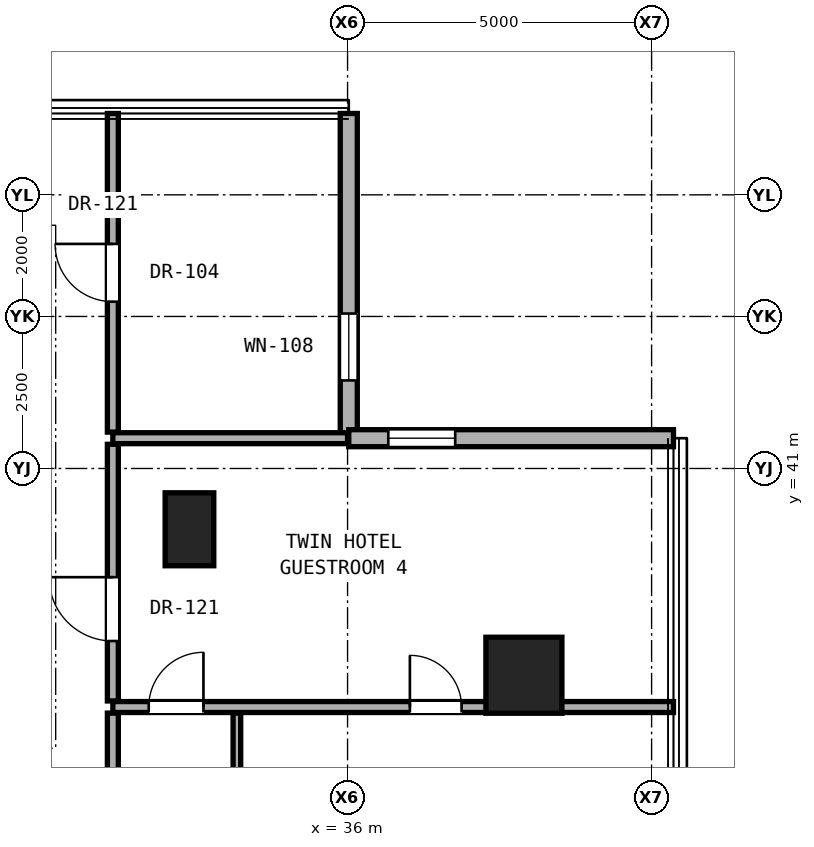
"""IFC4 building model, lengths in metres.
Left out: names, types, materials, properties, quantities, classifications, styles, units other than length and angle.
Written with IfcOpenShell. Run it as: python <this file> out.ifc"""

import sys

from ifc_helpers import new_model, si_unit, direction, frame, frame_2d, origin, origin_2d, place, context, subcontext, project, spatial, rectangle, hollow_rectangle, extrude, element, fill, save


model = new_model("IFC4")
c1 = context("Model", 3, precision=1e-05, world=origin(), true_north=direction((0.0, 1.0)))
c2 = subcontext(c1, "Body", "Model", "MODEL_VIEW")
j1 = project(units=[si_unit("LENGTHUNIT", "METRE"), si_unit("PLANEANGLEUNIT", "RADIAN")], contexts=[c1])
p1 = place(None, origin())
s1 = spatial("IfcSite", under=j1, at=p1, CompositionType="ELEMENT")
p2 = place(p1, origin())
s2 = spatial("IfcBuilding", under=s1, at=p2, CompositionType="ELEMENT")
p3 = place(p2, frame((0.0, 0.0, 55.4)))
s3 = spatial("IfcBuildingStorey", under=s2, at=p3, CompositionType="ELEMENT", Elevation=55.4)
p4 = place(p3, frame((38.9, 37.6, 0.0), z_axis=(0.0, 0.0, 1.0), x_axis=(1.0, 0.0, 0.0)))
e1 = element("IfcColumn", 1, at=p4, inside=s3, PredefinedType="COLUMN", context=c2, shape_type="SweptSolid", body=[
    extrude(hollow_rectangle(XDim=1.25, YDim=1.25, WallThickness=0.07, at=origin_2d()), origin(), (0.0, 0.0, 1.0), 3.3),
])
p5 = place(p3, frame((33.4, 40.0, 0.0), z_axis=(0.0, 0.0, 1.0), x_axis=(1.0, 0.0, 0.0)))
e2 = element("IfcColumn", 2, at=p5, inside=s3, PredefinedType="PILASTER", context=c2, shape_type="SweptSolid", body=[
    extrude(rectangle(XDim=0.8, YDim=1.2, at=origin_2d()), origin(), (0.0, 0.0, 1.0), 3.3),
])
p6 = place(p3, frame((36.02, 41.498, 0.0), z_axis=(0.0, 0.0, 1.0), x_axis=(0.0, 1.0, 0.0)))
e3 = element("IfcWall", 3, at=p6, inside=s3, PredefinedType="SOLIDWALL", context=c2, shape_type="SweptSolid", body=[
    extrude(rectangle(XDim=5.34, YDim=0.28, at=frame_2d((2.67, 0.0))), origin(), (0.0, 0.0, 1.0), 3.04),
])
p7 = place(p6, frame((0.95, 0.0, 0.85)))
e4 = element("IfcOpeningElement", 4, at=p7, cuts=e3, PredefinedType="OPENING", context=c2, shape_type="SweptSolid", body=[
    extrude(rectangle(XDim=1.1, YDim=2.0, at=frame_2d((0.55, 1.0))), frame((0.0, 0.15, 0.0), z_axis=(0.0, -1.0, 0.0), x_axis=(1.0, 0.0, 0.0)), (0.0, 0.0, 1.0), 0.3),
])
p8 = place(p3, frame((41.36, 41.498, 0.0), z_axis=(0.0, 0.0, 1.0), x_axis=(-1.0, 0.0, 0.0)))
e5 = element("IfcWall", 5, at=p8, inside=s3, PredefinedType="SOLIDWALL", context=c2, shape_type="SweptSolid", body=[
    extrude(rectangle(XDim=5.34, YDim=0.28, at=frame_2d((2.67, 0.0))), origin(), (0.0, 0.0, 1.0), 3.04),
])
p9 = place(p8, frame((3.59, 0.0, 0.85)))
e6 = element("IfcOpeningElement", 6, at=p9, cuts=e5, PredefinedType="OPENING", context=c2, shape_type="SweptSolid", body=[
    extrude(rectangle(XDim=1.1, YDim=2.0, at=frame_2d((0.55, 1.0))), frame((0.0, 0.15, 0.0), z_axis=(0.0, -1.0, 0.0), x_axis=(1.0, 0.0, 0.0)), (0.0, 0.0, 1.0), 0.3),
])
p10 = place(p3, frame((32.14, 37.077, 0.0), z_axis=(0.0, 0.0, 1.0), x_axis=(1.0, 0.0, 0.0)))
e7 = element("IfcWall", 7, at=p10, inside=s3, PredefinedType="PARTITIONING", context=c2, shape_type="SweptSolid", body=[
    extrude(rectangle(XDim=9.22, YDim=0.18, at=frame_2d((4.61, 0.0))), origin(), (0.0, 0.0, 1.0), 2.125),
])
p11 = place(p10, frame((4.885, 0.0, 0.0)))
e8 = element("IfcOpeningElement", 8, at=p11, cuts=e7, PredefinedType="OPENING", context=c2, shape_type="SweptSolid", body=[
    extrude(rectangle(XDim=0.85, YDim=2.01, at=frame_2d((0.425, 1.005))), frame((0.0, 0.1, 0.0), z_axis=(0.0, -1.0, 0.0), x_axis=(1.0, 0.0, 0.0)), (0.0, 0.0, 1.0), 0.2),
])
p12 = place(p10, frame((0.59, 0.0, 0.0)))
e9 = element("IfcOpeningElement", 9, at=p12, cuts=e7, PredefinedType="OPENING", context=c2, shape_type="SweptSolid", body=[
    extrude(rectangle(XDim=0.9, YDim=2.1, at=frame_2d((0.45, 1.05))), frame((0.0, 0.1, 0.0), z_axis=(0.0, -1.0, 0.0), x_axis=(1.0, 0.0, 0.0)), (0.0, 0.0, 1.0), 0.2),
])
p13 = place(p3, frame((32.14, 41.498, 0.0), z_axis=(0.0, 0.0, 1.0), x_axis=(1.0, 0.0, 0.0)))
e10 = element("IfcWall", 10, at=p13, inside=s3, PredefinedType="PARTITIONING", context=c2, shape_type="SweptSolid", body=[
    extrude(rectangle(XDim=3.86, YDim=0.18, at=frame_2d((1.93, 0.0))), origin(), (0.0, 0.0, 1.0), 3.06),
])
p14 = place(p3, frame((32.14, 34.429, 0.0), z_axis=(0.0, 0.0, 1.0), x_axis=(0.0, 1.0, 0.0)))
e11 = element("IfcWall", 11, at=p14, inside=s3, PredefinedType="PARTITIONING", context=c2, shape_type="SweptSolid", body=[
    extrude(rectangle(XDim=2.548, YDim=0.18, at=frame_2d((1.274, 0.0))), origin(), (0.0, 0.0, 1.0), 3.06),
])
p15 = place(p3, frame((32.14, 37.177, 0.0), z_axis=(0.0, 0.0, 1.0), x_axis=(0.0, 1.0, 0.0)))
e12 = element("IfcWall", 12, at=p15, inside=s3, PredefinedType="PARTITIONING", context=c2, shape_type="SweptSolid", body=[
    extrude(rectangle(XDim=4.221, YDim=0.18, at=frame_2d((2.11, 0.0))), origin(), (0.0, 0.0, 1.0), 2.436),
])
p16 = place(p15, frame((0.986, 0.0, 0.0)))
e13 = element("IfcOpeningElement", 13, at=p16, cuts=e12, PredefinedType="OPENING", context=c2, shape_type="SweptSolid", body=[
    extrude(rectangle(XDim=1.05, YDim=2.2, at=frame_2d((0.525, 1.1))), frame((0.0, 0.1, 0.0), z_axis=(0.0, -1.0, 0.0), x_axis=(1.0, 0.0, 0.0)), (0.0, 0.0, 1.0), 0.2),
])
p17 = place(p3, frame((32.14, 41.598, 0.0), z_axis=(0.0, 0.0, 1.0), x_axis=(0.0, 1.0, 0.0)))
e14 = element("IfcWall", 14, at=p17, inside=s3, PredefinedType="PARTITIONING", context=c2, shape_type="SweptSolid", body=[
    extrude(rectangle(XDim=5.24, YDim=0.18, at=frame_2d((2.62, 0.0))), origin(), (0.0, 0.0, 1.0), 3.06),
])
p18 = place(p17, frame((2.145, 0.0, 0.0)))
e15 = element("IfcOpeningElement", 15, at=p18, cuts=e14, PredefinedType="OPENING", context=c2, shape_type="SweptSolid", body=[
    extrude(rectangle(XDim=0.95, YDim=2.15, at=frame_2d((0.475, 1.075))), frame((0.0, 0.1, 0.0), z_axis=(0.0, -1.0, 0.0), x_axis=(1.0, 0.0, 0.0)), (0.0, 0.0, 1.0), 0.2),
])
p19 = place(p3, frame((34.18, 34.429, 0.0), z_axis=(0.0, 0.0, 1.0), x_axis=(0.0, 1.0, 0.0)))
e16 = element("IfcWall", 16, at=p19, inside=s3, PredefinedType="PARTITIONING", context=c2, shape_type="SweptSolid", body=[
    extrude(rectangle(XDim=2.548, YDim=0.125, at=frame_2d((1.274, 0.0))), origin(), (0.0, 0.0, 1.0), 3.06),
])
p20 = place(p7, origin())
e17 = element("IfcWindow", 17, at=p20, inside=s3, PartitioningType="SINGLE_PANEL", PredefinedType="WINDOW", context=c2, shape_type="SweptSolid", body=[
    extrude(rectangle(XDim=1.1, YDim=2.0, at=frame_2d((0.55, 1.0))), frame((0.0, 0.03, 0.0), z_axis=(0.0, -1.0, 0.0), x_axis=(1.0, 0.0, 0.0)), (0.0, 0.0, 1.0), 0.06),
])
fill(e4, e17)
p21 = place(p9, origin())
e18 = element("IfcWindow", 18, at=p21, inside=s3, PartitioningType="SINGLE_PANEL", PredefinedType="WINDOW", context=c2, shape_type="SweptSolid", body=[
    extrude(rectangle(XDim=1.1, YDim=2.0, at=frame_2d((0.55, 1.0))), frame((0.0, 0.03, 0.0), z_axis=(0.0, -1.0, 0.0), x_axis=(1.0, 0.0, 0.0)), (0.0, 0.0, 1.0), 0.06),
])
fill(e6, e18)
p22 = place(p16, origin())
e19 = element("IfcDoor", 19, at=p22, inside=s3, OperationType="SINGLE_SWING_RIGHT", PredefinedType="DOOR", context=c2, shape_type="SweptSolid", body=[
    extrude(rectangle(XDim=1.05, YDim=2.2, at=frame_2d((0.525, 1.1))), frame((0.0, 0.025, 0.0), z_axis=(0.0, -1.0, 0.0), x_axis=(1.0, 0.0, 0.0)), (0.0, 0.0, 1.0), 0.05),
])
fill(e13, e19)
p23 = place(p11, origin())
e20 = element("IfcDoor", 20, at=p23, inside=s3, OperationType="SINGLE_SWING_LEFT", PredefinedType="DOOR", context=c2, shape_type="SweptSolid", body=[
    extrude(rectangle(XDim=0.85, YDim=2.01, at=frame_2d((0.425, 1.005))), frame((0.0, 0.025, 0.0), z_axis=(0.0, -1.0, 0.0), x_axis=(1.0, 0.0, 0.0)), (0.0, 0.0, 1.0), 0.05),
])
fill(e8, e20)
p24 = place(p12, origin())
e21 = element("IfcDoor", 21, at=p24, inside=s3, OperationType="SINGLE_SWING_RIGHT", PredefinedType="DOOR", context=c2, shape_type="SweptSolid", body=[
    extrude(rectangle(XDim=0.9, YDim=2.1, at=frame_2d((0.45, 1.05))), frame((0.0, 0.025, 0.0), z_axis=(0.0, -1.0, 0.0), x_axis=(1.0, 0.0, 0.0)), (0.0, 0.0, 1.0), 0.05),
])
fill(e9, e21)
p25 = place(p18, origin())
e22 = element("IfcDoor", 22, at=p25, inside=s3, OperationType="SINGLE_SWING_RIGHT", PredefinedType="DOOR", context=c2, shape_type="SweptSolid", body=[
    extrude(rectangle(XDim=0.95, YDim=2.15, at=frame_2d((0.475, 1.075))), frame((0.0, 0.025, 0.0), z_axis=(0.0, -1.0, 0.0), x_axis=(1.0, 0.0, 0.0)), (0.0, 0.0, 1.0), 0.05),
])
fill(e15, e22)
save(model, sys.argv[1])
